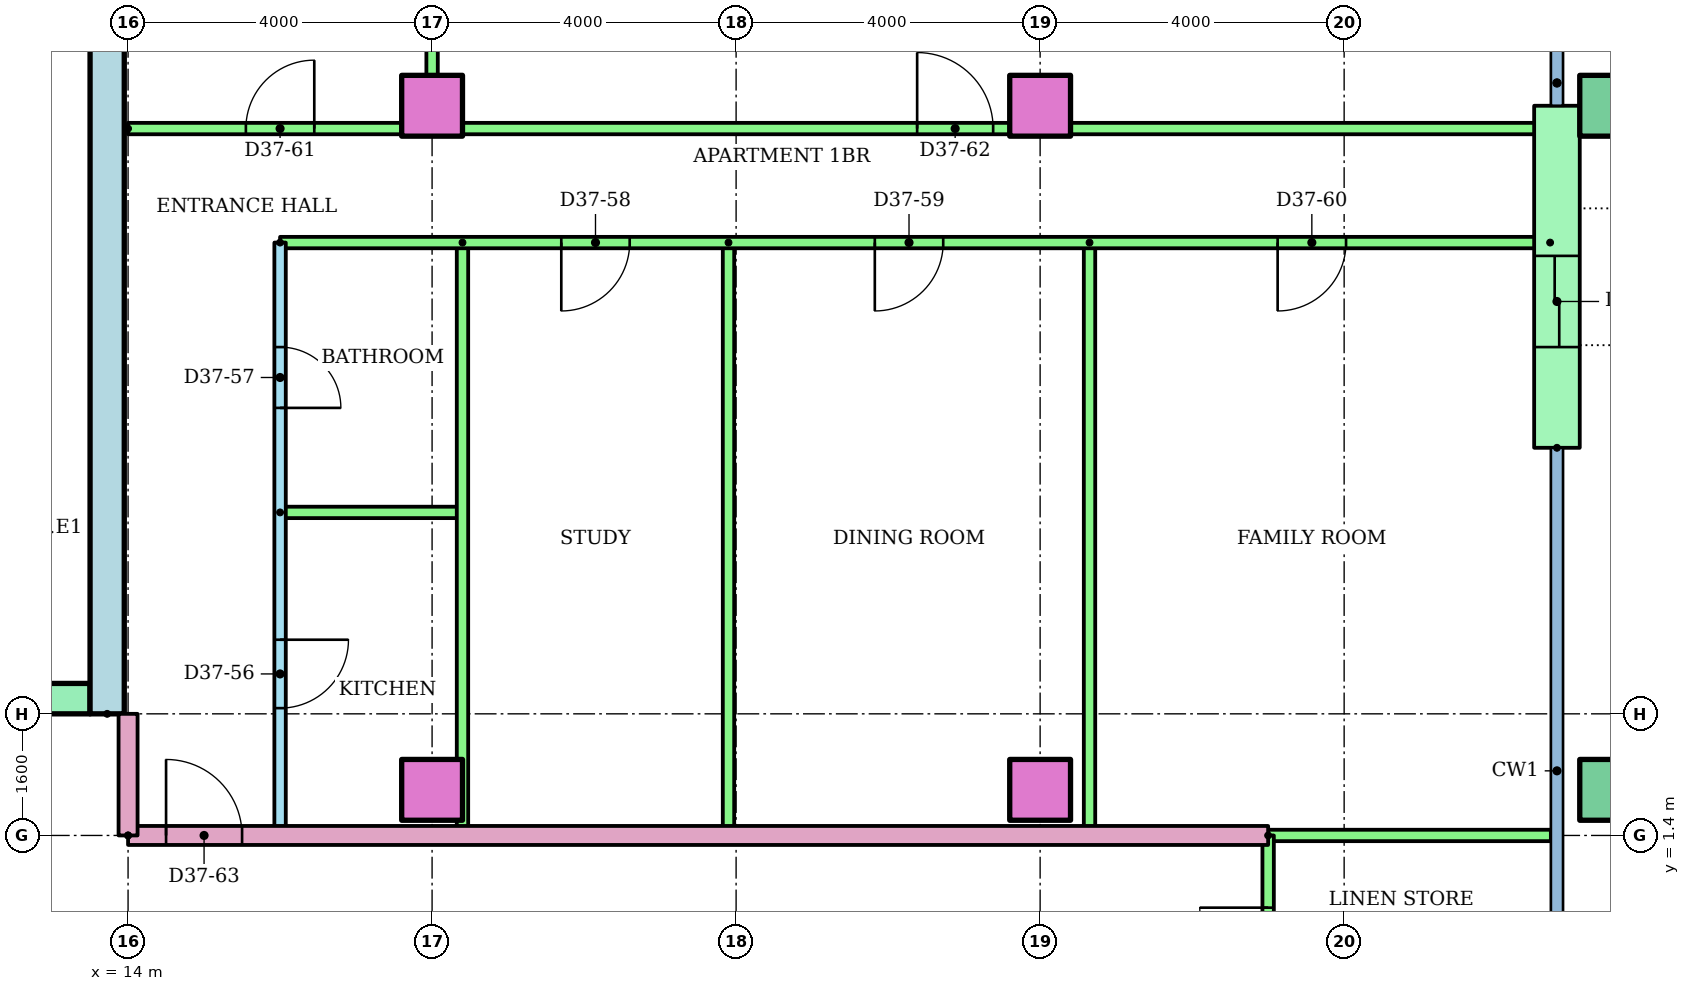
"""IFC4 building model, lengths in metres.
Left out: names, types, materials, properties, quantities, classifications, styles, units other than length and angle.
Written with IfcOpenShell. Run it as: python <this file> out.ifc"""

import sys

from ifc_helpers import new_model, si_unit, direction, frame, frame_2d, origin, origin_2d, place, context, subcontext, project, spatial, rectangle, hollow_rectangle, extrude, element, fill, save


model = new_model("IFC4")
c1 = context("Model", 3, precision=1e-05, world=origin(), true_north=direction((0.0, 1.0)))
c2 = subcontext(c1, "Body", "Model", "MODEL_VIEW")
j1 = project(units=[si_unit("LENGTHUNIT", "METRE"), si_unit("PLANEANGLEUNIT", "RADIAN")], contexts=[c1])
p1 = place(None, origin())
s1 = spatial("IfcSite", under=j1, at=p1, CompositionType="ELEMENT")
p2 = place(p1, origin())
s2 = spatial("IfcBuilding", under=s1, at=p2, CompositionType="ELEMENT")
p3 = place(p2, frame((0.0, 0.0, 142.2)))
s3 = spatial("IfcBuildingStorey", under=s2, at=p3, CompositionType="ELEMENT", Elevation=142.2)
for number, where in (
    (1, (18.0, 2.0, 0.0)),
    (2, (26.0, 2.0, 0.0)),
):
    element("IfcColumn", number, at=place(p3, frame(where)), inside=s3, PredefinedType="COLUMN", context=c2, shape_type="SweptSolid", body=[
        extrude(rectangle(XDim=0.8, YDim=0.8, at=origin_2d()), origin(), (0.0, 0.0, 1.0), 3.2),
    ])
p4 = place(p3, frame((33.5, 2.0, 0.0)))
e3 = element("IfcColumn", 3, at=p4, inside=s3, PredefinedType="COLUMN", context=c2, shape_type="SweptSolid", body=[
    extrude(hollow_rectangle(XDim=0.8, YDim=0.8, WallThickness=0.04, at=origin_2d()), origin(), (0.0, 0.0, 1.0), 3.2),
])
for number, where in (
    (4, (18.0, 11.0, 0.0)),
    (5, (26.0, 11.0, 0.0)),
):
    element("IfcColumn", number, at=place(p3, frame(where)), inside=s3, PredefinedType="COLUMN", context=c2, shape_type="SweptSolid", body=[
        extrude(rectangle(XDim=0.8, YDim=0.8, at=origin_2d()), origin(), (0.0, 0.0, 1.0), 3.2),
    ])
p5 = place(p3, frame((33.5, 11.0, 0.0)))
e6 = element("IfcColumn", 6, at=p5, inside=s3, PredefinedType="COLUMN", context=c2, shape_type="SweptSolid", body=[
    extrude(hollow_rectangle(XDim=0.8, YDim=0.8, WallThickness=0.04, at=origin_2d()), origin(), (0.0, 0.0, 1.0), 3.2),
])
p6 = place(p3, frame((32.8, 6.5, 0.0), z_axis=(0.0, 0.0, 1.0), x_axis=(0.0, 1.0, 0.0)))
e7 = element("IfcWall", 7, at=p6, inside=s3, PredefinedType="STANDARD", context=c2, shape_type="SweptSolid", body=[
    extrude(rectangle(XDim=4.5, YDim=0.6, at=frame_2d((2.25, 0.0))), origin(), (0.0, 0.0, 1.0), 2.92),
])
p7 = place(p6, frame((1.325, 0.0, 0.0)))
e8 = element("IfcOpeningElement", 8, at=p7, cuts=e7, PredefinedType="OPENING", context=c2, shape_type="SweptSolid", body=[
    extrude(rectangle(XDim=1.2, YDim=2.1, at=frame_2d((0.6, 1.05))), frame((0.0, 0.31, 0.0), z_axis=(0.0, -1.0, 0.0), x_axis=(1.0, 0.0, 0.0)), (0.0, 0.0, 1.0), 0.62),
])
p8 = place(p3, frame((13.725, 3.0, 0.0), z_axis=(0.0, 0.0, 1.0), x_axis=(0.0, 1.0, 0.0)))
e9 = element("IfcWall", 9, at=p8, inside=s3, PredefinedType="SHEAR", context=c2, shape_type="SweptSolid", body=[
    extrude(rectangle(XDim=17.0, YDim=0.45, at=frame_2d((8.5, 0.0))), origin(), (0.0, 0.0, 1.0), 2.92),
])
p9 = place(p3, frame((-13.5, 3.2, 0.0)))
e10 = element("IfcWall", 10, at=p9, inside=s3, PredefinedType="SHEAR", context=c2, shape_type="SweptSolid", body=[
    extrude(rectangle(XDim=27.0, YDim=0.4, at=frame_2d((13.5, 0.0))), origin(), (0.0, 0.0, 1.0), 2.92),
])
p10 = place(p9, frame((6.861, 0.0, 0.0)))
e11 = element("IfcOpeningElement", 11, at=p10, cuts=e10, PredefinedType="OPENING", context=c2, shape_type="SweptSolid", body=[
    extrude(rectangle(XDim=1.1, YDim=2.1, at=frame_2d((0.55, 1.05))), frame((0.0, 0.21, 0.0), z_axis=(0.0, -1.0, 0.0), x_axis=(1.0, 0.0, 0.0)), (0.0, 0.0, 1.0), 0.42),
])
p11 = place(p9, frame((9.906, 0.0, 0.0)))
e12 = element("IfcOpeningElement", 12, at=p11, cuts=e10, PredefinedType="OPENING", context=c2, shape_type="SweptSolid", body=[
    extrude(rectangle(XDim=1.1, YDim=2.1, at=frame_2d((0.55, 1.05))), frame((0.0, 0.21, 0.0), z_axis=(0.0, -1.0, 0.0), x_axis=(1.0, 0.0, 0.0)), (0.0, 0.0, 1.0), 0.42),
])
p12 = place(p9, frame((15.994, 0.0, 0.0)))
e13 = element("IfcOpeningElement", 13, at=p12, cuts=e10, PredefinedType="OPENING", context=c2, shape_type="SweptSolid", body=[
    extrude(rectangle(XDim=1.1, YDim=2.1, at=frame_2d((0.55, 1.05))), frame((0.0, 0.21, 0.0), z_axis=(0.0, -1.0, 0.0), x_axis=(1.0, 0.0, 0.0)), (0.0, 0.0, 1.0), 0.42),
])
p13 = place(p9, frame((19.039, 0.0, 0.0)))
e14 = element("IfcOpeningElement", 14, at=p13, cuts=e10, PredefinedType="OPENING", context=c2, shape_type="SweptSolid", body=[
    extrude(rectangle(XDim=1.1, YDim=2.1, at=frame_2d((0.55, 1.05))), frame((0.0, 0.21, 0.0), z_axis=(0.0, -1.0, 0.0), x_axis=(1.0, 0.0, 0.0)), (0.0, 0.0, 1.0), 0.42),
])
p14 = place(p9, frame((12.6, 0.0, 0.0)))
e15 = element("IfcOpeningElement", 15, at=p14, cuts=e10, PredefinedType="OPENING", context=c2, shape_type="SweptSolid", body=[
    extrude(rectangle(XDim=1.8, YDim=2.1, at=frame_2d((0.9, 1.05))), frame((0.0, 0.21, 0.0), z_axis=(0.0, -1.0, 0.0), x_axis=(1.0, 0.0, 0.0)), (0.0, 0.0, 1.0), 0.42),
])
p15 = place(p3, frame((16.0, 9.2, 0.0), z_axis=(0.0, 0.0, 1.0), x_axis=(0.0, -1.0, 0.0)))
e16 = element("IfcWall", 16, at=p15, inside=s3, PredefinedType="PARTITIONING", context=c2, shape_type="SweptSolid", body=[
    extrude(rectangle(XDim=7.8, YDim=0.15, at=frame_2d((3.9, 0.0))), origin(), (0.0, 0.0, 1.0), 2.4),
])
p16 = place(p15, frame((5.225, 0.0, 0.0)))
e17 = element("IfcOpeningElement", 17, at=p16, cuts=e16, PredefinedType="OPENING", context=c2, shape_type="SweptSolid", body=[
    extrude(rectangle(XDim=0.9, YDim=2.1, at=frame_2d((0.45, 1.05))), frame((0.0, 0.085, 0.0), z_axis=(0.0, -1.0, 0.0), x_axis=(1.0, 0.0, 0.0)), (0.0, 0.0, 1.0), 0.17),
])
p17 = place(p15, frame((1.375, 0.0, 0.0)))
e18 = element("IfcOpeningElement", 18, at=p17, cuts=e16, PredefinedType="OPENING", context=c2, shape_type="SweptSolid", body=[
    extrude(rectangle(XDim=0.8, YDim=2.1, at=frame_2d((0.4, 1.05))), frame((0.0, 0.085, 0.0), z_axis=(0.0, -1.0, 0.0), x_axis=(1.0, 0.0, 0.0)), (0.0, 0.0, 1.0), 0.17),
])
p18 = place(p3, frame((16.0, 5.65, 0.0)))
e19 = element("IfcWall", 19, at=p18, inside=s3, PredefinedType="PARTITIONING", context=c2, shape_type="SweptSolid", body=[
    extrude(rectangle(XDim=2.4, YDim=0.15, at=frame_2d((1.2, 0.0))), origin(), (0.0, 0.0, 1.0), 2.4),
])
for number, where, z_axis, x_axis in (
    (20, (18.4, 9.2, 0.0), (0.0, 0.0, 1.0), (0.0, -1.0, 0.0)),
    (21, (21.9, 9.2, 0.0), (0.0, 0.0, 1.0), (0.0, -1.0, 0.0)),
    (22, (26.65, 9.2, 0.0), (0.0, 0.0, 1.0), (0.0, -1.0, 0.0)),
):
    element("IfcWall", number, at=place(p3, frame(where, z_axis=z_axis, x_axis=x_axis)), inside=s3, PredefinedType="PARTITIONING", context=c2, shape_type="SweptSolid", body=[
        extrude(rectangle(XDim=7.8, YDim=0.15, at=frame_2d((3.9, 0.0))), origin(), (0.0, 0.0, 1.0), 2.4),
    ])
p19 = place(p3, frame((32.71, 9.2, 0.0), z_axis=(0.0, 0.0, 1.0), x_axis=(-1.0, 0.0, 0.0)))
e23 = element("IfcWall", 23, at=p19, inside=s3, PredefinedType="PARTITIONING", context=c2, shape_type="SweptSolid", body=[
    extrude(rectangle(XDim=16.71, YDim=0.15, at=frame_2d((8.355, 0.0))), origin(), (0.0, 0.0, 1.0), 2.4),
])
p20 = place(p19, frame((12.11, 0.0, 0.0)))
e24 = element("IfcOpeningElement", 24, at=p20, cuts=e23, PredefinedType="OPENING", context=c2, shape_type="SweptSolid", body=[
    extrude(rectangle(XDim=0.9, YDim=2.1, at=frame_2d((0.45, 1.05))), frame((0.0, 0.085, 0.0), z_axis=(0.0, -1.0, 0.0), x_axis=(1.0, 0.0, 0.0)), (0.0, 0.0, 1.0), 0.17),
])
p21 = place(p19, frame((7.985, 0.0, 0.0)))
e25 = element("IfcOpeningElement", 25, at=p21, cuts=e23, PredefinedType="OPENING", context=c2, shape_type="SweptSolid", body=[
    extrude(rectangle(XDim=0.9, YDim=2.1, at=frame_2d((0.45, 1.05))), frame((0.0, 0.085, 0.0), z_axis=(0.0, -1.0, 0.0), x_axis=(1.0, 0.0, 0.0)), (0.0, 0.0, 1.0), 0.17),
])
p22 = place(p19, frame((2.685, 0.0, 0.0)))
e26 = element("IfcOpeningElement", 26, at=p22, cuts=e23, PredefinedType="OPENING", context=c2, shape_type="SweptSolid", body=[
    extrude(rectangle(XDim=0.9, YDim=2.1, at=frame_2d((0.45, 1.05))), frame((0.0, 0.085, 0.0), z_axis=(0.0, -1.0, 0.0), x_axis=(1.0, 0.0, 0.0)), (0.0, 0.0, 1.0), 0.17),
])
p23 = place(p3, frame((14.0, 10.7, 0.0)))
e27 = element("IfcWall", 27, at=p23, inside=s3, PredefinedType="PARTITIONING", context=c2, shape_type="SweptSolid", body=[
    extrude(rectangle(XDim=18.71, YDim=0.15, at=frame_2d((9.355, 0.0))), origin(), (0.0, 0.0, 1.0), 2.4),
])
p24 = place(p23, frame((1.55, 0.0, 0.0)))
e28 = element("IfcOpeningElement", 28, at=p24, cuts=e27, PredefinedType="OPENING", context=c2, shape_type="SweptSolid", body=[
    extrude(rectangle(XDim=0.9, YDim=2.1, at=frame_2d((0.45, 1.05))), frame((0.0, 0.085, 0.0), z_axis=(0.0, -1.0, 0.0), x_axis=(1.0, 0.0, 0.0)), (0.0, 0.0, 1.0), 0.17),
])
p25 = place(p23, frame((10.382, 0.0, 0.0)))
e29 = element("IfcOpeningElement", 29, at=p25, cuts=e27, PredefinedType="OPENING", context=c2, shape_type="SweptSolid", body=[
    extrude(rectangle(XDim=1.0, YDim=2.1, at=frame_2d((0.5, 1.05))), frame((0.0, 0.085, 0.0), z_axis=(0.0, -1.0, 0.0), x_axis=(1.0, 0.0, 0.0)), (0.0, 0.0, 1.0), 0.17),
])
p26 = place(p3, frame((18.0, 18.721, 0.0), z_axis=(0.0, 0.0, 1.0), x_axis=(0.0, -1.0, 0.0)))
e30 = element("IfcWall", 30, at=p26, inside=s3, PredefinedType="PARTITIONING", context=c2, shape_type="SweptSolid", body=[
    extrude(rectangle(XDim=8.021, YDim=0.15, at=frame_2d((4.01, 0.0))), origin(), (0.0, 0.0, 1.0), 2.4),
])
p27 = place(p3, frame((14.0, 1.4, 0.0)))
e31 = element("IfcWall", 31, at=p27, inside=s3, PredefinedType="PARTITIONING", context=c2, shape_type="SweptSolid", body=[
    extrude(rectangle(XDim=15.0, YDim=0.25, at=frame_2d((7.5, 0.0))), origin(), (0.0, 0.0, 1.0), 2.4),
])
p28 = place(p27, frame((0.5, 0.0, 0.0)))
e32 = element("IfcOpeningElement", 32, at=p28, cuts=e31, PredefinedType="OPENING", context=c2, shape_type="SweptSolid", body=[
    extrude(rectangle(XDim=1.0, YDim=2.1, at=frame_2d((0.5, 1.05))), frame((0.0, 0.135, 0.0), z_axis=(0.0, -1.0, 0.0), x_axis=(1.0, 0.0, 0.0)), (0.0, 0.0, 1.0), 0.27),
])
p29 = place(p3, frame((29.0, 1.4, 0.0)))
e33 = element("IfcWall", 33, at=p29, inside=s3, PredefinedType="PARTITIONING", context=c2, shape_type="SweptSolid", body=[
    extrude(rectangle(XDim=3.72, YDim=0.15, at=frame_2d((1.86, 0.0))), origin(), (0.0, 0.0, 1.0), 2.4),
])
p30 = place(p3, frame((29.0, -1.4, 0.0), z_axis=(0.0, 0.0, 1.0), x_axis=(0.0, 1.0, 0.0)))
e34 = element("IfcWall", 34, at=p30, inside=s3, PredefinedType="PARTITIONING", context=c2, shape_type="SweptSolid", body=[
    extrude(rectangle(XDim=2.8, YDim=0.15, at=frame_2d((1.4, 0.0))), origin(), (0.0, 0.0, 1.0), 2.4),
])
p31 = place(p30, frame((0.95, 0.0, 0.0)))
e35 = element("IfcOpeningElement", 35, at=p31, cuts=e34, PredefinedType="OPENING", context=c2, shape_type="SweptSolid", body=[
    extrude(rectangle(XDim=0.9, YDim=2.1, at=frame_2d((0.45, 1.05))), frame((0.0, 0.085, 0.0), z_axis=(0.0, -1.0, 0.0), x_axis=(1.0, 0.0, 0.0)), (0.0, 0.0, 1.0), 0.17),
])
p32 = place(p3, frame((14.0, 1.4, 0.0), z_axis=(0.0, 0.0, 1.0), x_axis=(0.0, 1.0, 0.0)))
e36 = element("IfcWall", 36, at=p32, inside=s3, PredefinedType="PARTITIONING", context=c2, shape_type="SweptSolid", body=[
    extrude(rectangle(XDim=1.6, YDim=0.25, at=frame_2d((0.8, 0.0))), origin(), (0.0, 0.0, 1.0), 2.4),
])
p33 = place(p16, origin())
e37 = element("IfcDoor", 37, at=p33, inside=s3, OperationType="SINGLE_SWING_LEFT", PredefinedType="DOOR", context=c2, shape_type="SweptSolid", body=[
    extrude(rectangle(XDim=0.9, YDim=2.1, at=frame_2d((0.45, 1.05))), frame((0.0, 0.025, 0.0), z_axis=(0.0, -1.0, 0.0), x_axis=(1.0, 0.0, 0.0)), (0.0, 0.0, 1.0), 0.05),
])
fill(e17, e37)
p34 = place(p17, origin())
e38 = element("IfcDoor", 38, at=p34, inside=s3, OperationType="SINGLE_SWING_RIGHT", PredefinedType="DOOR", context=c2, shape_type="SweptSolid", body=[
    extrude(rectangle(XDim=0.8, YDim=2.1, at=frame_2d((0.4, 1.05))), frame((0.0, 0.025, 0.0), z_axis=(0.0, -1.0, 0.0), x_axis=(1.0, 0.0, 0.0)), (0.0, 0.0, 1.0), 0.05),
])
fill(e18, e38)
p35 = place(p20, origin())
e39 = element("IfcDoor", 39, at=p35, inside=s3, OperationType="SINGLE_SWING_RIGHT", PredefinedType="DOOR", context=c2, shape_type="SweptSolid", body=[
    extrude(rectangle(XDim=0.9, YDim=2.1, at=frame_2d((0.45, 1.05))), frame((0.0, 0.025, 0.0), z_axis=(0.0, -1.0, 0.0), x_axis=(1.0, 0.0, 0.0)), (0.0, 0.0, 1.0), 0.05),
])
fill(e24, e39)
p36 = place(p21, origin())
e40 = element("IfcDoor", 40, at=p36, inside=s3, OperationType="SINGLE_SWING_RIGHT", PredefinedType="DOOR", context=c2, shape_type="SweptSolid", body=[
    extrude(rectangle(XDim=0.9, YDim=2.1, at=frame_2d((0.45, 1.05))), frame((0.0, 0.025, 0.0), z_axis=(0.0, -1.0, 0.0), x_axis=(1.0, 0.0, 0.0)), (0.0, 0.0, 1.0), 0.05),
])
fill(e25, e40)
p37 = place(p22, origin())
e41 = element("IfcDoor", 41, at=p37, inside=s3, OperationType="SINGLE_SWING_RIGHT", PredefinedType="DOOR", context=c2, shape_type="SweptSolid", body=[
    extrude(rectangle(XDim=0.9, YDim=2.1, at=frame_2d((0.45, 1.05))), frame((0.0, 0.025, 0.0), z_axis=(0.0, -1.0, 0.0), x_axis=(1.0, 0.0, 0.0)), (0.0, 0.0, 1.0), 0.05),
])
fill(e26, e41)
p38 = place(p24, origin())
e42 = element("IfcDoor", 42, at=p38, inside=s3, OperationType="SINGLE_SWING_RIGHT", PredefinedType="DOOR", context=c2, shape_type="SweptSolid", body=[
    extrude(rectangle(XDim=0.9, YDim=2.1, at=frame_2d((0.45, 1.05))), frame((0.0, 0.025, 0.0), z_axis=(0.0, -1.0, 0.0), x_axis=(1.0, 0.0, 0.0)), (0.0, 0.0, 1.0), 0.05),
])
fill(e28, e42)
p39 = place(p25, origin())
e43 = element("IfcDoor", 43, at=p39, inside=s3, OperationType="SINGLE_SWING_LEFT", PredefinedType="DOOR", context=c2, shape_type="SweptSolid", body=[
    extrude(rectangle(XDim=1.0, YDim=2.1, at=frame_2d((0.5, 1.05))), frame((0.0, 0.025, 0.0), z_axis=(0.0, -1.0, 0.0), x_axis=(1.0, 0.0, 0.0)), (0.0, 0.0, 1.0), 0.05),
])
fill(e29, e43)
p40 = place(p28, origin())
e44 = element("IfcDoor", 44, at=p40, inside=s3, OperationType="SINGLE_SWING_LEFT", PredefinedType="DOOR", context=c2, shape_type="SweptSolid", body=[
    extrude(rectangle(XDim=1.0, YDim=2.1, at=frame_2d((0.5, 1.05))), frame((0.0, 0.025, 0.0), z_axis=(0.0, -1.0, 0.0), x_axis=(1.0, 0.0, 0.0)), (0.0, 0.0, 1.0), 0.05),
])
fill(e32, e44)
p41 = place(p31, origin())
e45 = element("IfcDoor", 45, at=p41, inside=s3, OperationType="SINGLE_SWING_RIGHT", PredefinedType="DOOR", context=c2, shape_type="SweptSolid", body=[
    extrude(rectangle(XDim=0.9, YDim=2.1, at=frame_2d((0.45, 1.05))), frame((0.0, 0.025, 0.0), z_axis=(0.0, -1.0, 0.0), x_axis=(1.0, 0.0, 0.0)), (0.0, 0.0, 1.0), 0.05),
])
fill(e35, e45)
p42 = place(p7, origin())
e46 = element("IfcDoor", 46, at=p42, inside=s3, OperationType="SLIDING_TO_LEFT", PredefinedType="DOOR", context=c2, shape_type="SweptSolid", body=[
    extrude(rectangle(XDim=1.2, YDim=2.1, at=frame_2d((0.6, 1.05))), frame((0.0, 0.025, 0.0), z_axis=(0.0, -1.0, 0.0), x_axis=(1.0, 0.0, 0.0)), (0.0, 0.0, 1.0), 0.05),
])
fill(e8, e46)
save(model, sys.argv[1])
